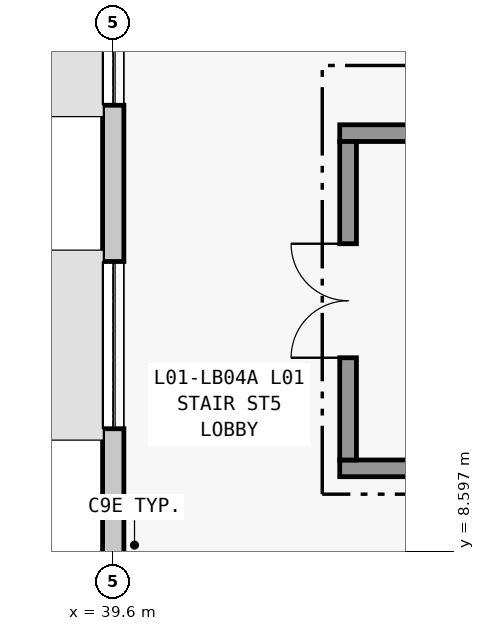
"""IFC4 building model, lengths in metres.
Left out: names, types, materials, properties, quantities, classifications, styles, units other than length and angle.
Written with IfcOpenShell. Run it as: python <this file> out.ifc"""

import sys

from ifc_helpers import new_model, si_unit, direction, frame, frame_2d, origin, place, context, subcontext, project, spatial, rectangle, extrude, element, fill, save


model = new_model("IFC4")
c1 = context("Model", 3, precision=1e-05, world=origin(), true_north=direction((0.0, 1.0)))
c2 = subcontext(c1, "Body", "Model", "MODEL_VIEW")
j1 = project(units=[si_unit("LENGTHUNIT", "METRE"), si_unit("PLANEANGLEUNIT", "RADIAN")], contexts=[c1])
p1 = place(None, origin())
s1 = spatial("IfcSite", under=j1, at=p1, CompositionType="ELEMENT")
p2 = place(p1, origin())
s2 = spatial("IfcBuilding", under=s1, at=p2, CompositionType="ELEMENT")
p3 = place(p2, frame((0.0, 0.0, 4.8)))
s3 = spatial("IfcBuildingStorey", under=s2, at=p3, CompositionType="ELEMENT", Elevation=4.8)
p4 = place(p3, frame((39.6, 16.65, 0.0), z_axis=(0.0, 0.0, 1.0), x_axis=(0.0, -1.0, 0.0)))
e1 = element("IfcWall", 1, at=p4, inside=s3, PredefinedType="STANDARD", context=c2, shape_type="SweptSolid", body=[
    extrude(rectangle(XDim=8.11, YDim=0.28, at=frame_2d((4.055, 0.0))), origin(), (0.0, 0.0, 1.0), 3.436),
])
p5 = place(p4, frame((0.683, 0.0, 1.05)))
e2 = element("IfcOpeningElement", 2, at=p5, cuts=e1, PredefinedType="OPENING", context=c2, shape_type="SweptSolid", body=[
    extrude(rectangle(XDim=1.5, YDim=1.5, at=frame_2d((0.75, 0.75))), frame((0.0, 0.155, 0.0), z_axis=(0.0, -1.0, 0.0), x_axis=(1.0, 0.0, 0.0)), (0.0, 0.0, 1.0), 0.31),
])
p6 = place(p4, frame((4.239, 0.0, 0.95)))
e3 = element("IfcOpeningElement", 3, at=p6, cuts=e1, PredefinedType="OPENING", context=c2, shape_type="SweptSolid", body=[
    extrude(rectangle(XDim=2.2, YDim=1.65, at=frame_2d((1.1, 0.825))), frame((0.0, 0.155, 0.0), z_axis=(0.0, -1.0, 0.0), x_axis=(1.0, 0.0, 0.0)), (0.0, 0.0, 1.0), 0.31),
])
for number, where, z_axis, x_axis in (
    (4, (42.58, 9.69, 0.0), (0.0, 0.0, 1.0), (1.0, 0.0, 0.0)),
    (5, (51.8, 14.1, 0.0), (0.0, 0.0, 1.0), (-1.0, 0.0, 0.0)),
):
    element("IfcWall", number, at=place(p3, frame(where, z_axis=z_axis, x_axis=x_axis)), inside=s3, PredefinedType="SOLIDWALL", context=c2, shape_type="SweptSolid", body=[
        extrude(rectangle(XDim=9.22, YDim=0.22, at=frame_2d((4.61, 0.0))), origin(), (0.0, 0.0, 1.0), 3.94),
    ])
p7 = place(p3, frame((42.69, 13.99, 0.0), z_axis=(0.0, 0.0, 1.0), x_axis=(0.0, -1.0, 0.0)))
e6 = element("IfcWall", 6, at=p7, inside=s3, PredefinedType="SOLIDWALL", context=c2, shape_type="SweptSolid", body=[
    extrude(rectangle(XDim=4.19, YDim=0.22, at=frame_2d((2.095, 0.0))), origin(), (0.0, 0.0, 1.0), 3.94),
])
p8 = place(p7, frame((1.345, 0.0, 0.0)))
e7 = element("IfcOpeningElement", 7, at=p8, cuts=e6, PredefinedType="OPENING", context=c2, shape_type="SweptSolid", body=[
    extrude(rectangle(XDim=1.5, YDim=2.2, at=frame_2d((0.75, 1.1))), frame((0.0, 0.125, 0.0), z_axis=(0.0, -1.0, 0.0), x_axis=(1.0, 0.0, 0.0)), (0.0, 0.0, 1.0), 0.25),
])
p9 = place(p5, origin())
e8 = element("IfcWindow", 8, at=p9, inside=s3, PartitioningType="SINGLE_PANEL", PredefinedType="WINDOW", context=c2, shape_type="SweptSolid", body=[
    extrude(rectangle(XDim=1.5, YDim=1.5, at=frame_2d((0.75, 0.75))), frame((0.0, 0.03, 0.0), z_axis=(0.0, -1.0, 0.0), x_axis=(1.0, 0.0, 0.0)), (0.0, 0.0, 1.0), 0.06),
])
fill(e2, e8)
p10 = place(p6, origin())
e9 = element("IfcWindow", 9, at=p10, inside=s3, PartitioningType="SINGLE_PANEL", PredefinedType="WINDOW", context=c2, shape_type="SweptSolid", body=[
    extrude(rectangle(XDim=2.2, YDim=1.65, at=frame_2d((1.1, 0.825))), frame((0.0, 0.03, 0.0), z_axis=(0.0, -1.0, 0.0), x_axis=(1.0, 0.0, 0.0)), (0.0, 0.0, 1.0), 0.06),
])
fill(e3, e9)
p11 = place(p8, frame((1.5, 0.0, 0.0), z_axis=(0.0, 0.0, 1.0), x_axis=(-1.0, 0.0, 0.0)))
e10 = element("IfcDoor", 10, at=p11, inside=s3, OperationType="DOUBLE_DOOR_SINGLE_SWING", PredefinedType="DOOR", context=c2, shape_type="SweptSolid", body=[
    extrude(rectangle(XDim=1.5, YDim=2.2, at=frame_2d((0.75, 1.1))), frame((0.0, 0.025, 0.0), z_axis=(0.0, -1.0, 0.0), x_axis=(1.0, 0.0, 0.0)), (0.0, 0.0, 1.0), 0.05),
])
fill(e7, e10)
save(model, sys.argv[1])
